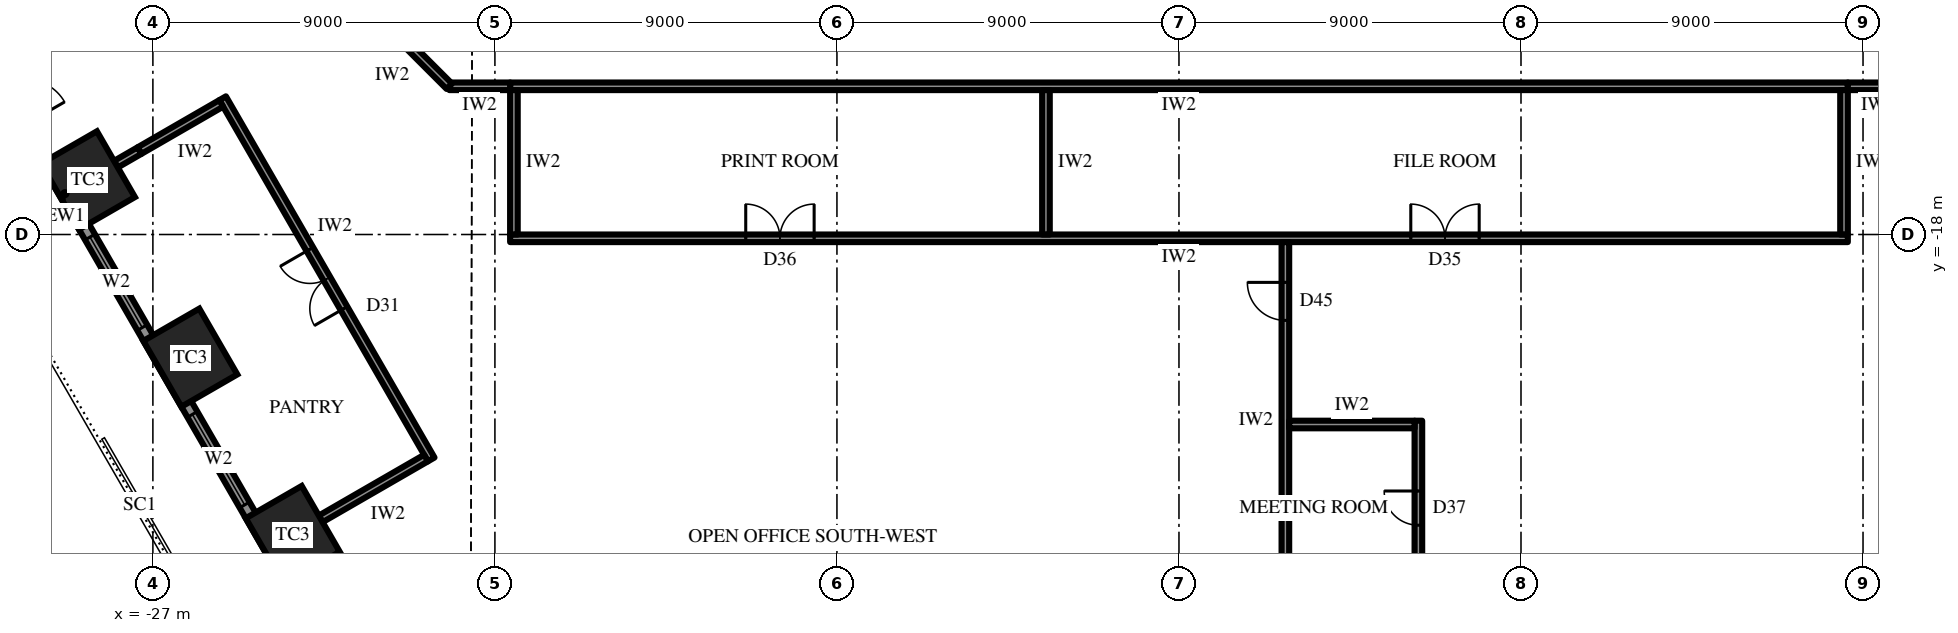
"""IFC4 building model, lengths in metres.
Left out: names, types, materials, properties, quantities, classifications, styles, units other than length and angle.
Written with IfcOpenShell. Run it as: python <this file> out.ifc"""

import sys

from ifc_helpers import new_model, si_unit, direction, frame, frame_2d, origin, origin_2d, place, context, subcontext, project, spatial, rectangle, extrude, element, fill, save


model = new_model("IFC4")
c1 = context("Model", 3, precision=1e-05, world=origin(), true_north=direction((0.0, 1.0)))
c2 = subcontext(c1, "Body", "Model", "MODEL_VIEW")
j1 = project(units=[si_unit("LENGTHUNIT", "METRE"), si_unit("PLANEANGLEUNIT", "RADIAN")], contexts=[c1])
p1 = place(None, origin())
s1 = spatial("IfcSite", under=j1, at=p1, CompositionType="ELEMENT")
p2 = place(p1, origin())
s2 = spatial("IfcBuilding", under=s1, at=p2, CompositionType="ELEMENT")
p3 = place(p2, frame((0.0, 0.0, 78.1)))
s3 = spatial("IfcBuildingStorey", under=s2, at=p3, CompositionType="ELEMENT", Elevation=78.1)
for number, where, z_axis, x_axis in (
    (1, (-28.709, -16.575, 0.0), (0.0, 0.0, 1.0), (0.5, -0.866, 0.0)),
    (2, (-26.014, -21.242, 0.0), (0.0, 0.0, 1.0), (0.5, -0.866, 0.0)),
    (3, (-23.32, -25.908, 0.0), (0.0, 0.0, 1.0), (0.5, -0.866, 0.0)),
):
    element("IfcColumn", number, at=place(p3, frame(where, z_axis=z_axis, x_axis=x_axis)), inside=s3, PredefinedType="COLUMN", context=c2, shape_type="SweptSolid", body=[
        extrude(rectangle(XDim=2.0, YDim=1.7, at=origin_2d()), origin(), (0.0, 0.0, 1.0), 4.2),
    ])
p4 = place(p3, frame((-37.398, -2.925, 0.0), z_axis=(0.0, 0.0, 1.0), x_axis=(0.499999163675, -0.866025886636, 0.0)))
e4 = element("IfcWall", 4, at=p4, inside=s3, PredefinedType="SOLIDWALL", context=c2, shape_type="SweptSolid", body=[
    extrude(rectangle(XDim=32.332, YDim=0.3, at=frame_2d((16.166, 0.0))), origin(), (0.0, 0.0, 1.0), 2.7),
])
p5 = place(p4, frame((1.319, 0.0, 0.6)))
e5 = element("IfcOpeningElement", 5, at=p5, cuts=e4, PredefinedType="OPENING", context=c2, shape_type="SweptSolid", body=[
    extrude(rectangle(XDim=2.75, YDim=1.85, at=frame_2d((1.375, 0.925))), frame((0.0, 0.16, 0.0), z_axis=(0.0, -1.0, 0.0), x_axis=(1.0, 0.0, 0.0)), (0.0, 0.0, 1.0), 0.32),
])
p6 = place(p4, frame((6.708, 0.0, 0.6)))
e6 = element("IfcOpeningElement", 6, at=p6, cuts=e4, PredefinedType="OPENING", context=c2, shape_type="SweptSolid", body=[
    extrude(rectangle(XDim=2.75, YDim=1.85, at=frame_2d((1.375, 0.925))), frame((0.0, 0.16, 0.0), z_axis=(0.0, -1.0, 0.0), x_axis=(1.0, 0.0, 0.0)), (0.0, 0.0, 1.0), 0.32),
])
p7 = place(p4, frame((12.872, 0.0, 0.0)))
e7 = element("IfcOpeningElement", 7, at=p7, cuts=e4, PredefinedType="OPENING", context=c2, shape_type="SweptSolid", body=[
    extrude(rectangle(XDim=1.2, YDim=2.4, at=frame_2d((0.6, 1.2))), frame((0.0, 0.16, 0.0), z_axis=(0.0, -1.0, 0.0), x_axis=(1.0, 0.0, 0.0)), (0.0, 0.0, 1.0), 0.32),
])
p8 = place(p4, frame((17.485, 0.0, 0.6)))
e8 = element("IfcOpeningElement", 8, at=p8, cuts=e4, PredefinedType="OPENING", context=c2, shape_type="SweptSolid", body=[
    extrude(rectangle(XDim=2.75, YDim=1.85, at=frame_2d((1.375, 0.925))), frame((0.0, 0.16, 0.0), z_axis=(0.0, -1.0, 0.0), x_axis=(1.0, 0.0, 0.0)), (0.0, 0.0, 1.0), 0.32),
])
p9 = place(p4, frame((22.874, 0.0, 0.6)))
e9 = element("IfcOpeningElement", 9, at=p9, cuts=e4, PredefinedType="OPENING", context=c2, shape_type="SweptSolid", body=[
    extrude(rectangle(XDim=2.75, YDim=1.85, at=frame_2d((1.375, 0.925))), frame((0.0, 0.16, 0.0), z_axis=(0.0, -1.0, 0.0), x_axis=(1.0, 0.0, 0.0)), (0.0, 0.0, 1.0), 0.32),
])
p10 = place(p4, frame((28.262, 0.0, 0.6)))
e10 = element("IfcOpeningElement", 10, at=p10, cuts=e4, PredefinedType="OPENING", context=c2, shape_type="SweptSolid", body=[
    extrude(rectangle(XDim=2.75, YDim=1.85, at=frame_2d((1.375, 0.925))), frame((0.0, 0.16, 0.0), z_axis=(0.0, -1.0, 0.0), x_axis=(1.0, 0.0, 0.0)), (0.0, 0.0, 1.0), 0.32),
])
p11 = place(p3, frame((17.6, -14.1, 0.0), z_axis=(0.0, 0.0, 1.0), x_axis=(-1.0, 0.0, 0.0)))
e11 = element("IfcWall", 11, at=p11, inside=s3, PredefinedType="PARTITIONING", context=c2, shape_type="SweptSolid", body=[
    extrude(rectangle(XDim=35.2, YDim=0.2, at=frame_2d((17.6, 0.0))), origin(), (0.0, 0.0, 1.0), 4.0),
])
p12 = place(p3, frame((17.6, -18.1, 0.0), z_axis=(0.0, 0.0, 1.0), x_axis=(-1.0, 0.0, 0.0)))
e12 = element("IfcWall", 12, at=p12, inside=s3, PredefinedType="PARTITIONING", context=c2, shape_type="SweptSolid", body=[
    extrude(rectangle(XDim=35.2, YDim=0.2, at=frame_2d((17.6, 0.0))), origin(), (0.0, 0.0, 1.0), 4.0),
])
p13 = place(p12, frame((9.7, 0.0, 0.0)))
e13 = element("IfcOpeningElement", 13, at=p13, cuts=e12, PredefinedType="OPENING", context=c2, shape_type="SweptSolid", body=[
    extrude(rectangle(XDim=1.8, YDim=2.4, at=frame_2d((0.9, 1.2))), frame((0.0, 0.11, 0.0), z_axis=(0.0, -1.0, 0.0), x_axis=(1.0, 0.0, 0.0)), (0.0, 0.0, 1.0), 0.22),
])
p14 = place(p12, frame((27.2, 0.0, 0.0)))
e14 = element("IfcOpeningElement", 14, at=p14, cuts=e12, PredefinedType="OPENING", context=c2, shape_type="SweptSolid", body=[
    extrude(rectangle(XDim=1.8, YDim=2.4, at=frame_2d((0.9, 1.2))), frame((0.0, 0.11, 0.0), z_axis=(0.0, -1.0, 0.0), x_axis=(1.0, 0.0, 0.0)), (0.0, 0.0, 1.0), 0.22),
])
for number, where, z_axis, x_axis in (
    (15, (17.5, -14.2, 0.0), (0.0, 0.0, 1.0), (0.0, -1.0, 0.0)),
    (16, (-3.5, -14.2, 0.0), (0.0, 0.0, 1.0), (0.0, -1.0, 0.0)),
    (17, (-17.5, -14.2, 0.0), (0.0, 0.0, 1.0), (0.0, -1.0, 0.0)),
):
    element("IfcWall", number, at=place(p3, frame(where, z_axis=z_axis, x_axis=x_axis)), inside=s3, PredefinedType="PARTITIONING", context=c2, shape_type="SweptSolid", body=[
        extrude(rectangle(XDim=3.8, YDim=0.2, at=frame_2d((1.9, 0.0))), origin(), (0.0, 0.0, 1.0), 4.0),
    ])
p15 = place(p3, frame((-25.165, -14.413, 0.0), z_axis=(0.0, 0.0, 1.0), x_axis=(0.500009305389, -0.866020031249, 0.0)))
e18 = element("IfcWall", 18, at=p15, inside=s3, PredefinedType="PARTITIONING", context=c2, shape_type="SweptSolid", body=[
    extrude(rectangle(XDim=10.977, YDim=0.2, at=frame_2d((5.489, 0.0))), origin(), (0.0, 0.0, 1.0), 4.0),
])
p16 = place(p15, frame((4.589, 0.0, 0.0)))
e19 = element("IfcOpeningElement", 19, at=p16, cuts=e18, PredefinedType="OPENING", context=c2, shape_type="SweptSolid", body=[
    extrude(rectangle(XDim=1.8, YDim=2.4, at=frame_2d((0.9, 1.2))), frame((0.0, 0.11, 0.0), z_axis=(0.0, -1.0, 0.0), x_axis=(1.0, 0.0, 0.0)), (0.0, 0.0, 1.0), 0.22),
])
p17 = place(p3, frame((-25.201, -14.55, 0.0), z_axis=(0.0, 0.0, 1.0), x_axis=(-0.866020232408, -0.500008956979, 0.0)))
e20 = element("IfcWall", 20, at=p17, inside=s3, PredefinedType="PARTITIONING", context=c2, shape_type="SweptSolid", body=[
    extrude(rectangle(XDim=2.483, YDim=0.2, at=frame_2d((1.242, 0.0))), origin(), (0.0, 0.0, 1.0), 4.0),
])
p18 = place(p3, frame((-27.352, -15.792, 0.0), z_axis=(0.0, 0.0, 1.0), x_axis=(-0.866117509073, -0.499840435016, 0.0)))
e21 = element("IfcWall", 21, at=p18, inside=s3, PredefinedType="PARTITIONING", context=c2, shape_type="SweptSolid", body=[
    extrude(rectangle(XDim=0.717, YDim=0.2, at=frame_2d((0.358, 0.0))), origin(), (0.0, 0.0, 1.0), 2.992),
])
p19 = place(p3, frame((-19.813, -23.883, 0.0), z_axis=(0.0, 0.0, 1.0), x_axis=(-0.866008981251, -0.500028443584, 0.0)))
e22 = element("IfcWall", 22, at=p19, inside=s3, PredefinedType="PARTITIONING", context=c2, shape_type="SweptSolid", body=[
    extrude(rectangle(XDim=3.2, YDim=0.2, at=frame_2d((1.6, 0.0))), origin(), (0.0, 0.0, 1.0), 2.992),
])
for number, where, z_axis, x_axis in (
    (23, (-17.6, -14.1, 0.0), (0.0, 0.0, 1.0), (-1.0, 0.0, 0.0)),
    (24, (19.2, -14.1, 0.0), (0.0, 0.0, 1.0), (-1.0, 0.0, 0.0)),
):
    element("IfcWall", number, at=place(p3, frame(where, z_axis=z_axis, x_axis=x_axis)), inside=s3, PredefinedType="PARTITIONING", context=c2, shape_type="SweptSolid", body=[
        extrude(rectangle(XDim=1.6, YDim=0.2, at=frame_2d((0.8, 0.0))), origin(), (0.0, 0.0, 1.0), 4.0),
    ])
p20 = place(p3, frame((-19.2, -14.1, 0.0), z_axis=(0.0, 0.0, 1.0), x_axis=(-0.707106781187, 0.707106781187, 0.0)))
e25 = element("IfcWall", 25, at=p20, inside=s3, PredefinedType="PARTITIONING", context=c2, shape_type="SweptSolid", body=[
    extrude(rectangle(XDim=2.546, YDim=0.2, at=frame_2d((1.273, 0.0))), origin(), (0.0, 0.0, 1.0), 4.0),
])
p21 = place(p3, frame((2.8, -18.2, 0.0), z_axis=(0.0, 0.0, 1.0), x_axis=(0.0, -1.0, 0.0)))
e26 = element("IfcWall", 26, at=p21, inside=s3, PredefinedType="PARTITIONING", context=c2, shape_type="SweptSolid", body=[
    extrude(rectangle(XDim=15.6, YDim=0.2, at=frame_2d((7.8, 0.0))), origin(), (0.0, 0.0, 1.0), 2.944),
])
p22 = place(p21, frame((1.06, 0.0, 0.0)))
e27 = element("IfcOpeningElement", 27, at=p22, cuts=e26, PredefinedType="OPENING", context=c2, shape_type="SweptSolid", body=[
    extrude(rectangle(XDim=1.0, YDim=2.2, at=frame_2d((0.5, 1.1))), frame((0.0, 0.11, 0.0), z_axis=(0.0, -1.0, 0.0), x_axis=(1.0, 0.0, 0.0)), (0.0, 0.0, 1.0), 0.22),
])
p23 = place(p3, frame((6.3, -22.9, 0.0), z_axis=(0.0, 0.0, 1.0), x_axis=(0.0, -1.0, 0.0)))
e28 = element("IfcWall", 28, at=p23, inside=s3, PredefinedType="PARTITIONING", context=c2, shape_type="SweptSolid", body=[
    extrude(rectangle(XDim=6.2, YDim=0.2, at=frame_2d((3.1, 0.0))), origin(), (0.0, 0.0, 1.0), 4.0),
])
p24 = place(p23, frame((1.85, 0.0, 0.0)))
e29 = element("IfcOpeningElement", 29, at=p24, cuts=e28, PredefinedType="OPENING", context=c2, shape_type="SweptSolid", body=[
    extrude(rectangle(XDim=0.9, YDim=2.2, at=frame_2d((0.45, 1.1))), frame((0.0, 0.11, 0.0), z_axis=(0.0, -1.0, 0.0), x_axis=(1.0, 0.0, 0.0)), (0.0, 0.0, 1.0), 0.22),
])
p25 = place(p23, frame((4.85, 0.0, 0.0)))
e30 = element("IfcOpeningElement", 30, at=p25, cuts=e28, PredefinedType="OPENING", context=c2, shape_type="SweptSolid", body=[
    extrude(rectangle(XDim=0.9, YDim=2.2, at=frame_2d((0.45, 1.1))), frame((0.0, 0.11, 0.0), z_axis=(0.0, -1.0, 0.0), x_axis=(1.0, 0.0, 0.0)), (0.0, 0.0, 1.0), 0.22),
])
p26 = place(p3, frame((2.9, -23.0, 0.0), z_axis=(0.0, 0.0, 1.0), x_axis=(1.0, 0.0, 0.0)))
e31 = element("IfcWall", 31, at=p26, inside=s3, PredefinedType="PARTITIONING", context=c2, shape_type="SweptSolid", body=[
    extrude(rectangle(XDim=3.3, YDim=0.2, at=frame_2d((1.65, 0.0))), origin(), (0.0, 0.0, 1.0), 4.0),
])
p27 = place(p8, origin())
e32 = element("IfcWindow", 32, at=p27, inside=s3, PartitioningType="SINGLE_PANEL", PredefinedType="WINDOW", context=c2, shape_type="SweptSolid", body=[
    extrude(rectangle(XDim=2.75, YDim=1.85, at=frame_2d((1.375, 0.925))), frame((0.0, 0.03, 0.0), z_axis=(0.0, -1.0, 0.0), x_axis=(1.0, 0.0, 0.0)), (0.0, 0.0, 1.0), 0.06),
])
fill(e8, e32)
p28 = place(p9, origin())
e33 = element("IfcWindow", 33, at=p28, inside=s3, PartitioningType="SINGLE_PANEL", PredefinedType="WINDOW", context=c2, shape_type="SweptSolid", body=[
    extrude(rectangle(XDim=2.75, YDim=1.85, at=frame_2d((1.375, 0.925))), frame((0.0, 0.03, 0.0), z_axis=(0.0, -1.0, 0.0), x_axis=(1.0, 0.0, 0.0)), (0.0, 0.0, 1.0), 0.06),
])
fill(e9, e33)
p29 = place(p13, frame((1.8, 0.0, 0.0), z_axis=(0.0, 0.0, 1.0), x_axis=(-1.0, 0.0, 0.0)))
e34 = element("IfcDoor", 34, at=p29, inside=s3, OperationType="DOUBLE_DOOR_SINGLE_SWING", PredefinedType="DOOR", context=c2, shape_type="SweptSolid", body=[
    extrude(rectangle(XDim=1.8, YDim=2.4, at=frame_2d((0.9, 1.2))), frame((0.0, 0.025, 0.0), z_axis=(0.0, -1.0, 0.0), x_axis=(1.0, 0.0, 0.0)), (0.0, 0.0, 1.0), 0.05),
])
fill(e13, e34)
p30 = place(p14, frame((1.8, 0.0, 0.0), z_axis=(0.0, 0.0, 1.0), x_axis=(-1.0, 0.0, 0.0)))
e35 = element("IfcDoor", 35, at=p30, inside=s3, OperationType="DOUBLE_DOOR_SINGLE_SWING", PredefinedType="DOOR", context=c2, shape_type="SweptSolid", body=[
    extrude(rectangle(XDim=1.8, YDim=2.4, at=frame_2d((0.9, 1.2))), frame((0.0, 0.025, 0.0), z_axis=(0.0, -1.0, 0.0), x_axis=(1.0, 0.0, 0.0)), (0.0, 0.0, 1.0), 0.05),
])
fill(e14, e35)
p31 = place(p16, frame((1.8, 0.0, 0.0), z_axis=(0.0, 0.0, 1.0), x_axis=(-1.0, 0.0, 0.0)))
e36 = element("IfcDoor", 36, at=p31, inside=s3, OperationType="DOUBLE_DOOR_SINGLE_SWING", PredefinedType="DOOR", context=c2, shape_type="SweptSolid", body=[
    extrude(rectangle(XDim=1.8, YDim=2.4, at=frame_2d((0.9, 1.2))), frame((0.0, 0.025, 0.0), z_axis=(0.0, -1.0, 0.0), x_axis=(1.0, 0.0, 0.0)), (0.0, 0.0, 1.0), 0.05),
])
fill(e19, e36)
p32 = place(p22, frame((1.0, 0.0, 0.0), z_axis=(0.0, 0.0, 1.0), x_axis=(-1.0, 0.0, 0.0)))
e37 = element("IfcDoor", 37, at=p32, inside=s3, OperationType="SINGLE_SWING_LEFT", PredefinedType="DOOR", context=c2, shape_type="SweptSolid", body=[
    extrude(rectangle(XDim=1.0, YDim=2.2, at=frame_2d((0.5, 1.1))), frame((0.0, 0.025, 0.0), z_axis=(0.0, -1.0, 0.0), x_axis=(1.0, 0.0, 0.0)), (0.0, 0.0, 1.0), 0.05),
])
fill(e27, e37)
p33 = place(p24, frame((0.9, 0.0, 0.0), z_axis=(0.0, 0.0, 1.0), x_axis=(-1.0, 0.0, 0.0)))
e38 = element("IfcDoor", 38, at=p33, inside=s3, OperationType="SINGLE_SWING_LEFT", PredefinedType="DOOR", context=c2, shape_type="SweptSolid", body=[
    extrude(rectangle(XDim=0.9, YDim=2.2, at=frame_2d((0.45, 1.1))), frame((0.0, 0.025, 0.0), z_axis=(0.0, -1.0, 0.0), x_axis=(1.0, 0.0, 0.0)), (0.0, 0.0, 1.0), 0.05),
])
fill(e29, e38)
save(model, sys.argv[1])
